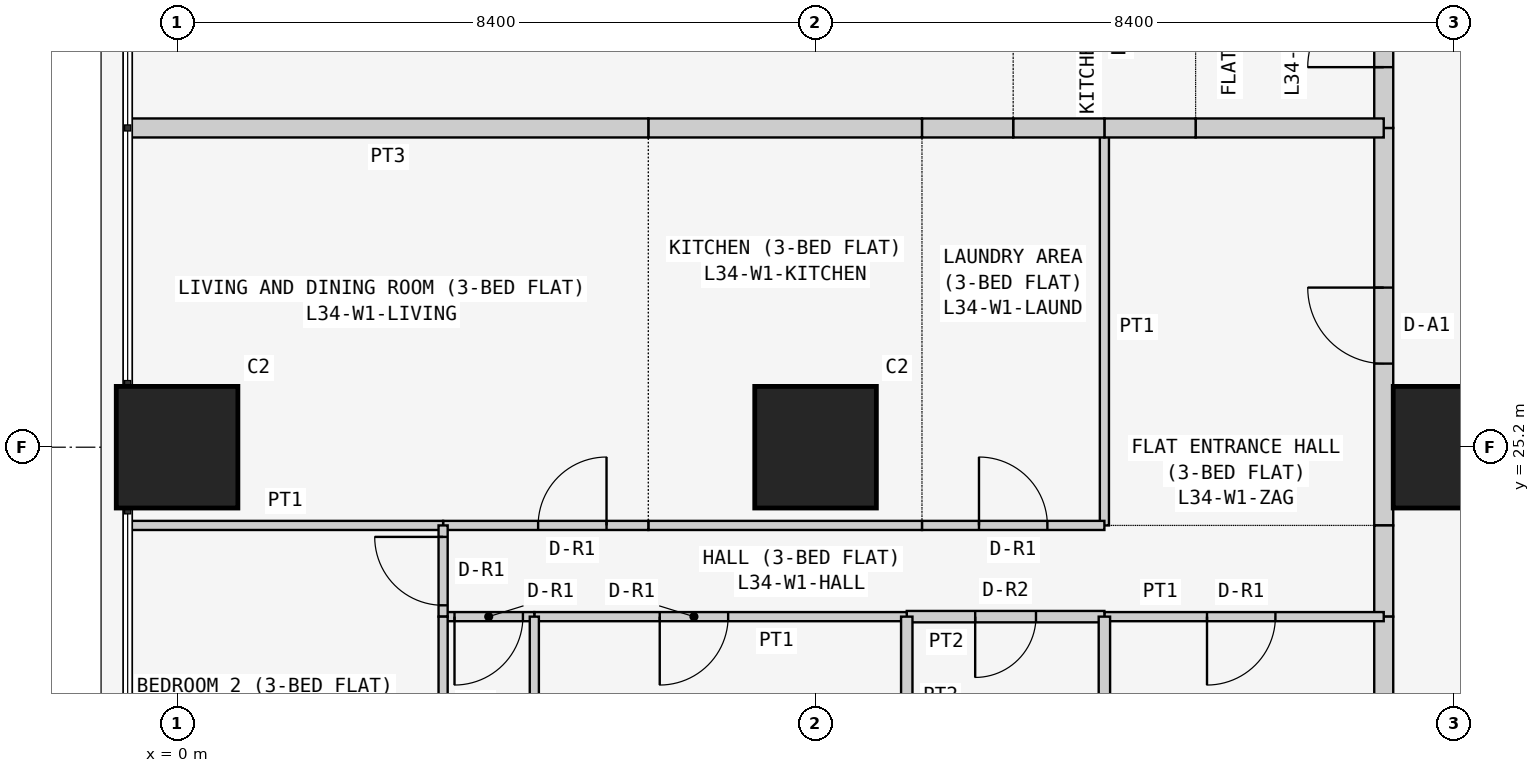
"""IFC4 building model, lengths in metres.
Left out: names, types, materials, properties, quantities, classifications, styles, units other than length and angle.
Written with IfcOpenShell. Run it as: python <this file> out.ifc"""

import sys

from ifc_helpers import new_model, si_unit, direction, frame, frame_2d, origin, origin_2d, place, context, subcontext, project, spatial, rectangle, extrude, element, fill, save


model = new_model("IFC4")
c1 = context("Model", 3, precision=1e-05, world=origin(), true_north=direction((0.0, 1.0)))
c2 = subcontext(c1, "Body", "Model", "MODEL_VIEW")
j1 = project(units=[si_unit("LENGTHUNIT", "METRE"), si_unit("PLANEANGLEUNIT", "RADIAN")], contexts=[c1])
p1 = place(None, origin())
s1 = spatial("IfcSite", under=j1, at=p1, CompositionType="ELEMENT")
p2 = place(p1, origin())
s2 = spatial("IfcBuilding", under=s1, at=p2, CompositionType="ELEMENT")
p3 = place(p2, frame((0.0, 0.0, 134.1)))
s3 = spatial("IfcBuildingStorey", under=s2, at=p3, CompositionType="ELEMENT", Elevation=134.1)
for number, where, z_axis, x_axis in (
    (1, (0.0, 25.2, 0.0), (0.0, 0.0, 1.0), (1.0, 0.0, 0.0)),
    (2, (8.4, 25.2, 0.0), (0.0, 0.0, 1.0), (1.0, 0.0, 0.0)),
    (3, (16.8, 25.2, 0.0), (0.0, 0.0, 1.0), (1.0, 0.0, 0.0)),
):
    element("IfcColumn", number, at=place(p3, frame(where, z_axis=z_axis, x_axis=x_axis)), inside=s3, PredefinedType="COLUMN", context=c2, shape_type="SweptSolid", body=[
        extrude(rectangle(XDim=1.6, YDim=1.6, at=origin_2d()), origin(), (0.0, 0.0, 1.0), 3.6),
    ])
p4 = place(p3, frame((15.875, 24.171, 0.0), z_axis=(0.0, 0.0, 1.0), x_axis=(0.0, 1.0, 0.0)))
e4 = element("IfcWall", 4, at=p4, inside=s3, PredefinedType="PARTITIONING", context=c2, shape_type="SweptSolid", body=[
    extrude(rectangle(XDim=5.229, YDim=0.25, at=frame_2d((2.615, 0.0))), origin(), (0.0, 0.0, 1.0), 3.45),
])
p5 = place(p4, frame((2.129, 0.0, 0.0)))
e5 = element("IfcOpeningElement", 5, at=p5, cuts=e4, PredefinedType="OPENING", context=c2, shape_type="SweptSolid", body=[
    extrude(rectangle(XDim=1.0, YDim=2.1, at=frame_2d((0.5, 1.05))), frame((0.0, 0.135, 0.0), z_axis=(0.0, -1.0, 0.0), x_axis=(1.0, 0.0, 0.0)), (0.0, 0.0, 1.0), 0.27),
])
p6 = place(p3, frame((15.875, 22.971, 0.0), z_axis=(0.0, 0.0, 1.0), x_axis=(0.0, 1.0, 0.0)))
e6 = element("IfcWall", 6, at=p6, inside=s3, PredefinedType="PARTITIONING", context=c2, shape_type="SweptSolid", body=[
    extrude(rectangle(XDim=1.2, YDim=0.25, at=frame_2d((0.6, 0.0))), origin(), (0.0, 0.0, 1.0), 3.45),
])
p7 = place(p3, frame((15.875, 16.1, 0.0), z_axis=(0.0, 0.0, 1.0), x_axis=(0.0, 1.0, 0.0)))
e7 = element("IfcWall", 7, at=p7, inside=s3, PredefinedType="PARTITIONING", context=c2, shape_type="SweptSolid", body=[
    extrude(rectangle(XDim=6.871, YDim=0.25, at=frame_2d((3.436, 0.0))), origin(), (0.0, 0.0, 1.0), 3.45),
])
p8 = place(p3, frame((15.875, 29.4, 0.0), z_axis=(0.0, 0.0, 1.0), x_axis=(0.0, 1.0, 0.0)))
e8 = element("IfcWall", 8, at=p8, inside=s3, PredefinedType="PARTITIONING", context=c2, shape_type="SweptSolid", body=[
    extrude(rectangle(XDim=2.6, YDim=0.25, at=frame_2d((1.3, 0.0))), origin(), (0.0, 0.0, 1.0), 3.45),
])
p9 = place(p8, frame((0.8, 0.0, 0.0)))
e9 = element("IfcOpeningElement", 9, at=p9, cuts=e8, PredefinedType="OPENING", context=c2, shape_type="SweptSolid", body=[
    extrude(rectangle(XDim=1.0, YDim=2.1, at=frame_2d((0.5, 1.05))), frame((0.0, 0.135, 0.0), z_axis=(0.0, -1.0, 0.0), x_axis=(1.0, 0.0, 0.0)), (0.0, 0.0, 1.0), 0.27),
])
p10 = place(p3, frame((12.2, 29.4, 0.0), z_axis=(0.0, 0.0, 1.0), x_axis=(0.0, -1.0, 0.0)))
e10 = element("IfcWall", 10, at=p10, inside=s3, PredefinedType="PARTITIONING", context=c2, shape_type="SweptSolid", body=[
    extrude(rectangle(XDim=5.229, YDim=0.12, at=frame_2d((2.615, 0.0))), origin(), (0.0, 0.0, 1.0), 3.45),
])
p11 = place(p3, frame((15.875, 29.4, 0.0), z_axis=(0.0, 0.0, 1.0), x_axis=(-1.0, 0.0, 0.0)))
e11 = element("IfcWall", 11, at=p11, inside=s3, PredefinedType="PARTITIONING", context=c2, shape_type="SweptSolid", body=[
    extrude(rectangle(XDim=2.475, YDim=0.25, at=frame_2d((1.238, 0.0))), origin(), (0.0, 0.0, 1.0), 3.45),
])
p12 = place(p3, frame((13.4, 29.4, 0.0), z_axis=(0.0, 0.0, 1.0), x_axis=(-1.0, 0.0, 0.0)))
e12 = element("IfcWall", 12, at=p12, inside=s3, PredefinedType="PARTITIONING", context=c2, shape_type="SweptSolid", body=[
    extrude(rectangle(XDim=1.2, YDim=0.25, at=frame_2d((0.6, 0.0))), origin(), (0.0, 0.0, 1.0), 3.45),
])
p13 = place(p3, frame((9.8, 24.171, 0.0), z_axis=(0.0, 0.0, 1.0), x_axis=(1.0, 0.0, 0.0)))
e13 = element("IfcWall", 13, at=p13, inside=s3, PredefinedType="PARTITIONING", context=c2, shape_type="SweptSolid", body=[
    extrude(rectangle(XDim=2.4, YDim=0.12, at=frame_2d((1.2, 0.0))), origin(), (0.0, 0.0, 1.0), 3.45),
])
p14 = place(p13, frame((0.75, 0.0, 0.0)))
e14 = element("IfcOpeningElement", 14, at=p14, cuts=e13, PredefinedType="OPENING", context=c2, shape_type="SweptSolid", body=[
    extrude(rectangle(XDim=0.9, YDim=2.1, at=frame_2d((0.45, 1.05))), frame((0.0, 0.07, 0.0), z_axis=(0.0, -1.0, 0.0), x_axis=(1.0, 0.0, 0.0)), (0.0, 0.0, 1.0), 0.14),
])
for number, where, z_axis, x_axis in (
    (15, (12.2, 29.4, 0.0), (0.0, 0.0, 1.0), (-1.0, 0.0, 0.0)),
    (16, (11.0, 29.4, 0.0), (0.0, 0.0, 1.0), (-1.0, 0.0, 0.0)),
):
    element("IfcWall", number, at=place(p3, frame(where, z_axis=z_axis, x_axis=x_axis)), inside=s3, PredefinedType="PARTITIONING", context=c2, shape_type="SweptSolid", body=[
        extrude(rectangle(XDim=1.2, YDim=0.25, at=frame_2d((0.6, 0.0))), origin(), (0.0, 0.0, 1.0), 3.45),
    ])
p15 = place(p3, frame((6.2, 24.171, 0.0), z_axis=(0.0, 0.0, 1.0), x_axis=(1.0, 0.0, 0.0)))
e17 = element("IfcWall", 17, at=p15, inside=s3, PredefinedType="PARTITIONING", context=c2, shape_type="SweptSolid", body=[
    extrude(rectangle(XDim=3.6, YDim=0.12, at=frame_2d((1.8, 0.0))), origin(), (0.0, 0.0, 1.0), 3.45),
])
p16 = place(p3, frame((9.8, 29.4, 0.0), z_axis=(0.0, 0.0, 1.0), x_axis=(-1.0, 0.0, 0.0)))
e18 = element("IfcWall", 18, at=p16, inside=s3, PredefinedType="PARTITIONING", context=c2, shape_type="SweptSolid", body=[
    extrude(rectangle(XDim=3.6, YDim=0.25, at=frame_2d((1.8, 0.0))), origin(), (0.0, 0.0, 1.0), 3.45),
])
p17 = place(p3, frame((3.5, 24.171, 0.0), z_axis=(0.0, 0.0, 1.0), x_axis=(1.0, 0.0, 0.0)))
e19 = element("IfcWall", 19, at=p17, inside=s3, PredefinedType="PARTITIONING", context=c2, shape_type="SweptSolid", body=[
    extrude(rectangle(XDim=2.7, YDim=0.12, at=frame_2d((1.35, 0.0))), origin(), (0.0, 0.0, 1.0), 3.45),
])
p18 = place(p17, frame((1.25, 0.0, 0.0)))
e20 = element("IfcOpeningElement", 20, at=p18, cuts=e19, PredefinedType="OPENING", context=c2, shape_type="SweptSolid", body=[
    extrude(rectangle(XDim=0.9, YDim=2.1, at=frame_2d((0.45, 1.05))), frame((0.0, 0.07, 0.0), z_axis=(0.0, -1.0, 0.0), x_axis=(1.0, 0.0, 0.0)), (0.0, 0.0, 1.0), 0.14),
])
p19 = place(p3, frame((-0.65, 24.171, 0.0), z_axis=(0.0, 0.0, 1.0), x_axis=(1.0, 0.0, 0.0)))
e21 = element("IfcWall", 21, at=p19, inside=s3, PredefinedType="PARTITIONING", context=c2, shape_type="SweptSolid", body=[
    extrude(rectangle(XDim=4.15, YDim=0.12, at=frame_2d((2.075, 0.0))), origin(), (0.0, 0.0, 1.0), 3.45),
])
p20 = place(p3, frame((6.2, 29.4, 0.0), z_axis=(0.0, 0.0, 1.0), x_axis=(-1.0, 0.0, 0.0)))
e22 = element("IfcWall", 22, at=p20, inside=s3, PredefinedType="PARTITIONING", context=c2, shape_type="SweptSolid", body=[
    extrude(rectangle(XDim=6.85, YDim=0.25, at=frame_2d((3.425, 0.0))), origin(), (0.0, 0.0, 1.0), 3.45),
])
p21 = place(p3, frame((12.2, 22.971, 0.0), z_axis=(0.0, 0.0, 1.0), x_axis=(1.0, 0.0, 0.0)))
e23 = element("IfcWall", 23, at=p21, inside=s3, PredefinedType="PARTITIONING", context=c2, shape_type="SweptSolid", body=[
    extrude(rectangle(XDim=3.675, YDim=0.12, at=frame_2d((1.837, 0.0))), origin(), (0.0, 0.0, 1.0), 3.45),
])
p22 = place(p21, frame((1.35, 0.0, 0.0)))
e24 = element("IfcOpeningElement", 24, at=p22, cuts=e23, PredefinedType="OPENING", context=c2, shape_type="SweptSolid", body=[
    extrude(rectangle(XDim=0.9, YDim=2.1, at=frame_2d((0.45, 1.05))), frame((0.0, 0.07, 0.0), z_axis=(0.0, -1.0, 0.0), x_axis=(1.0, 0.0, 0.0)), (0.0, 0.0, 1.0), 0.14),
])
p23 = place(p3, frame((9.6, 22.971, 0.0), z_axis=(0.0, 0.0, 1.0), x_axis=(1.0, 0.0, 0.0)))
e25 = element("IfcWall", 25, at=p23, inside=s3, PredefinedType="PARTITIONING", context=c2, shape_type="SweptSolid", body=[
    extrude(rectangle(XDim=2.6, YDim=0.15, at=frame_2d((1.3, 0.0))), origin(), (0.0, 0.0, 1.0), 3.45),
])
p24 = place(p23, frame((0.9, 0.0, 0.0)))
e26 = element("IfcOpeningElement", 26, at=p24, cuts=e25, PredefinedType="OPENING", context=c2, shape_type="SweptSolid", body=[
    extrude(rectangle(XDim=0.8, YDim=2.1, at=frame_2d((0.4, 1.05))), frame((0.0, 0.085, 0.0), z_axis=(0.0, -1.0, 0.0), x_axis=(1.0, 0.0, 0.0)), (0.0, 0.0, 1.0), 0.17),
])
p25 = place(p3, frame((4.7, 22.971, 0.0), z_axis=(0.0, 0.0, 1.0), x_axis=(1.0, 0.0, 0.0)))
e27 = element("IfcWall", 27, at=p25, inside=s3, PredefinedType="PARTITIONING", context=c2, shape_type="SweptSolid", body=[
    extrude(rectangle(XDim=4.9, YDim=0.12, at=frame_2d((2.45, 0.0))), origin(), (0.0, 0.0, 1.0), 3.45),
])
p26 = place(p25, frame((1.65, 0.0, 0.0)))
e28 = element("IfcOpeningElement", 28, at=p26, cuts=e27, PredefinedType="OPENING", context=c2, shape_type="SweptSolid", body=[
    extrude(rectangle(XDim=0.9, YDim=2.1, at=frame_2d((0.45, 1.05))), frame((0.0, 0.07, 0.0), z_axis=(0.0, -1.0, 0.0), x_axis=(1.0, 0.0, 0.0)), (0.0, 0.0, 1.0), 0.14),
])
p27 = place(p3, frame((3.5, 22.971, 0.0), z_axis=(0.0, 0.0, 1.0), x_axis=(1.0, 0.0, 0.0)))
e29 = element("IfcWall", 29, at=p27, inside=s3, PredefinedType="PARTITIONING", context=c2, shape_type="SweptSolid", body=[
    extrude(rectangle(XDim=1.2, YDim=0.12, at=frame_2d((0.6, 0.0))), origin(), (0.0, 0.0, 1.0), 3.45),
])
p28 = place(p27, frame((0.15, 0.0, 0.0)))
e30 = element("IfcOpeningElement", 30, at=p28, cuts=e29, PredefinedType="OPENING", context=c2, shape_type="SweptSolid", body=[
    extrude(rectangle(XDim=0.9, YDim=2.1, at=frame_2d((0.45, 1.05))), frame((0.0, 0.07, 0.0), z_axis=(0.0, -1.0, 0.0), x_axis=(1.0, 0.0, 0.0)), (0.0, 0.0, 1.0), 0.14),
])
p29 = place(p3, frame((3.5, 24.171, 0.0), z_axis=(0.0, 0.0, 1.0), x_axis=(0.0, -1.0, 0.0)))
e31 = element("IfcWall", 31, at=p29, inside=s3, PredefinedType="PARTITIONING", context=c2, shape_type="SweptSolid", body=[
    extrude(rectangle(XDim=1.2, YDim=0.12, at=frame_2d((0.6, 0.0))), origin(), (0.0, 0.0, 1.0), 3.45),
])
p30 = place(p29, frame((0.151, 0.0, 0.0)))
e32 = element("IfcOpeningElement", 32, at=p30, cuts=e31, PredefinedType="OPENING", context=c2, shape_type="SweptSolid", body=[
    extrude(rectangle(XDim=0.9, YDim=2.1, at=frame_2d((0.45, 1.05))), frame((0.0, 0.07, 0.0), z_axis=(0.0, -1.0, 0.0), x_axis=(1.0, 0.0, 0.0)), (0.0, 0.0, 1.0), 0.14),
])
for number, where, z_axis, x_axis in (
    (33, (12.2, 22.971, 0.0), (0.0, 0.0, 1.0), (0.0, -1.0, 0.0)),
    (34, (9.6, 22.971, 0.0), (0.0, 0.0, 1.0), (0.0, -1.0, 0.0)),
):
    element("IfcWall", number, at=place(p3, frame(where, z_axis=z_axis, x_axis=x_axis)), inside=s3, PredefinedType="PARTITIONING", context=c2, shape_type="SweptSolid", body=[
        extrude(rectangle(XDim=2.971, YDim=0.15, at=frame_2d((1.485, 0.0))), origin(), (0.0, 0.0, 1.0), 3.45),
    ])
for number, where, z_axis, x_axis in (
    (35, (4.7, 22.971, 0.0), (0.0, 0.0, 1.0), (0.0, -1.0, 0.0)),
    (36, (3.5, 22.971, 0.0), (0.0, 0.0, 1.0), (0.0, -1.0, 0.0)),
):
    element("IfcWall", number, at=place(p3, frame(where, z_axis=z_axis, x_axis=x_axis)), inside=s3, PredefinedType="PARTITIONING", context=c2, shape_type="SweptSolid", body=[
        extrude(rectangle(XDim=2.285, YDim=0.12, at=frame_2d((1.143, 0.0))), origin(), (0.0, 0.0, 1.0), 3.45),
    ])
p31 = place(p5, origin())
e37 = element("IfcDoor", 37, at=p31, inside=s3, OperationType="SINGLE_SWING_RIGHT", PredefinedType="DOOR", context=c2, shape_type="SweptSolid", body=[
    extrude(rectangle(XDim=1.0, YDim=2.1, at=frame_2d((0.5, 1.05))), frame((0.0, 0.025, 0.0), z_axis=(0.0, -1.0, 0.0), x_axis=(1.0, 0.0, 0.0)), (0.0, 0.0, 1.0), 0.05),
])
fill(e5, e37)
p32 = place(p14, origin())
e38 = element("IfcDoor", 38, at=p32, inside=s3, OperationType="SINGLE_SWING_LEFT", PredefinedType="DOOR", context=c2, shape_type="SweptSolid", body=[
    extrude(rectangle(XDim=0.9, YDim=2.1, at=frame_2d((0.45, 1.05))), frame((0.0, 0.025, 0.0), z_axis=(0.0, -1.0, 0.0), x_axis=(1.0, 0.0, 0.0)), (0.0, 0.0, 1.0), 0.05),
])
fill(e14, e38)
p33 = place(p18, origin())
e39 = element("IfcDoor", 39, at=p33, inside=s3, OperationType="SINGLE_SWING_RIGHT", PredefinedType="DOOR", context=c2, shape_type="SweptSolid", body=[
    extrude(rectangle(XDim=0.9, YDim=2.1, at=frame_2d((0.45, 1.05))), frame((0.0, 0.025, 0.0), z_axis=(0.0, -1.0, 0.0), x_axis=(1.0, 0.0, 0.0)), (0.0, 0.0, 1.0), 0.05),
])
fill(e20, e39)
p34 = place(p22, frame((0.9, 0.0, 0.0), z_axis=(0.0, 0.0, 1.0), x_axis=(-1.0, 0.0, 0.0)))
e40 = element("IfcDoor", 40, at=p34, inside=s3, OperationType="SINGLE_SWING_RIGHT", PredefinedType="DOOR", context=c2, shape_type="SweptSolid", body=[
    extrude(rectangle(XDim=0.9, YDim=2.1, at=frame_2d((0.45, 1.05))), frame((0.0, 0.025, 0.0), z_axis=(0.0, -1.0, 0.0), x_axis=(1.0, 0.0, 0.0)), (0.0, 0.0, 1.0), 0.05),
])
fill(e24, e40)
p35 = place(p24, frame((0.8, 0.0, 0.0), z_axis=(0.0, 0.0, 1.0), x_axis=(-1.0, 0.0, 0.0)))
e41 = element("IfcDoor", 41, at=p35, inside=s3, OperationType="SINGLE_SWING_RIGHT", PredefinedType="DOOR", context=c2, shape_type="SweptSolid", body=[
    extrude(rectangle(XDim=0.8, YDim=2.1, at=frame_2d((0.4, 1.05))), frame((0.0, 0.025, 0.0), z_axis=(0.0, -1.0, 0.0), x_axis=(1.0, 0.0, 0.0)), (0.0, 0.0, 1.0), 0.05),
])
fill(e26, e41)
p36 = place(p26, frame((0.9, 0.0, 0.0), z_axis=(0.0, 0.0, 1.0), x_axis=(-1.0, 0.0, 0.0)))
e42 = element("IfcDoor", 42, at=p36, inside=s3, OperationType="SINGLE_SWING_RIGHT", PredefinedType="DOOR", context=c2, shape_type="SweptSolid", body=[
    extrude(rectangle(XDim=0.9, YDim=2.1, at=frame_2d((0.45, 1.05))), frame((0.0, 0.025, 0.0), z_axis=(0.0, -1.0, 0.0), x_axis=(1.0, 0.0, 0.0)), (0.0, 0.0, 1.0), 0.05),
])
fill(e28, e42)
p37 = place(p28, frame((0.9, 0.0, 0.0), z_axis=(0.0, 0.0, 1.0), x_axis=(-1.0, 0.0, 0.0)))
e43 = element("IfcDoor", 43, at=p37, inside=s3, OperationType="SINGLE_SWING_RIGHT", PredefinedType="DOOR", context=c2, shape_type="SweptSolid", body=[
    extrude(rectangle(XDim=0.9, YDim=2.1, at=frame_2d((0.45, 1.05))), frame((0.0, 0.025, 0.0), z_axis=(0.0, -1.0, 0.0), x_axis=(1.0, 0.0, 0.0)), (0.0, 0.0, 1.0), 0.05),
])
fill(e30, e43)
p38 = place(p30, frame((0.9, 0.0, 0.0), z_axis=(0.0, 0.0, 1.0), x_axis=(-1.0, 0.0, 0.0)))
e44 = element("IfcDoor", 44, at=p38, inside=s3, OperationType="SINGLE_SWING_RIGHT", PredefinedType="DOOR", context=c2, shape_type="SweptSolid", body=[
    extrude(rectangle(XDim=0.9, YDim=2.1, at=frame_2d((0.45, 1.05))), frame((0.0, 0.025, 0.0), z_axis=(0.0, -1.0, 0.0), x_axis=(1.0, 0.0, 0.0)), (0.0, 0.0, 1.0), 0.05),
])
fill(e32, e44)
p39 = place(p9, origin())
e45 = element("IfcDoor", 45, at=p39, inside=s3, OperationType="SINGLE_SWING_LEFT", PredefinedType="DOOR", context=c2, shape_type="SweptSolid", body=[
    extrude(rectangle(XDim=1.0, YDim=2.1, at=frame_2d((0.5, 1.05))), frame((0.0, 0.025, 0.0), z_axis=(0.0, -1.0, 0.0), x_axis=(1.0, 0.0, 0.0)), (0.0, 0.0, 1.0), 0.05),
])
fill(e9, e45)
save(model, sys.argv[1])
